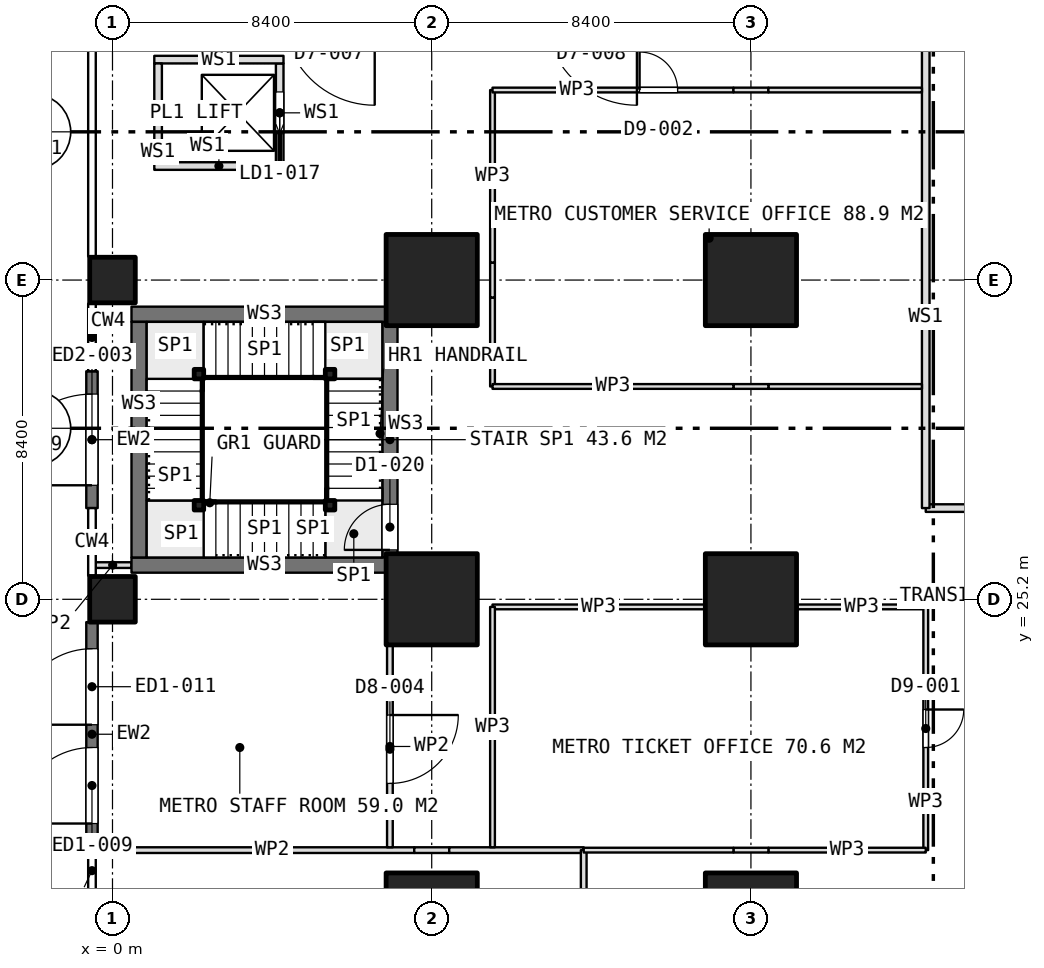
"""IFC4 building model, lengths in metres.
Left out: names, types, materials, properties, quantities, classifications, styles, units other than length and angle.
Written with IfcOpenShell. Run it as: python <this file> out.ifc"""

import sys

from ifc_helpers import new_model, si_unit, direction, frame, frame_2d, origin, origin_2d, place, context, subcontext, project, spatial, rectangle, extrude, element, fill, save


model = new_model("IFC4")
c1 = context("Model", 3, precision=1e-05, world=origin(), true_north=direction((0.0, 1.0)))
c2 = subcontext(c1, "Body", "Model", "MODEL_VIEW")
j1 = project(units=[si_unit("LENGTHUNIT", "METRE"), si_unit("PLANEANGLEUNIT", "RADIAN")], contexts=[c1])
p1 = place(None, origin())
s1 = spatial("IfcSite", under=j1, at=p1, CompositionType="ELEMENT")
p2 = place(p1, origin())
s2 = spatial("IfcBuilding", under=s1, at=p2, CompositionType="ELEMENT")
p3 = place(p2, origin())
s3 = spatial("IfcBuildingStorey", under=s2, at=p3, CompositionType="ELEMENT", Elevation=0.0)
for number, where, z_axis, x_axis in (
    (1, (0.0, 25.2, 0.0), (0.0, 0.0, 1.0), (1.0, 0.0, 0.0)),
    (2, (0.0, 33.6, 0.0), (0.0, 0.0, 1.0), (1.0, 0.0, 0.0)),
):
    element("IfcColumn", number, at=place(p3, frame(where, z_axis=z_axis, x_axis=x_axis)), inside=s3, PredefinedType="COLUMN", context=c2, shape_type="SweptSolid", body=[
        extrude(rectangle(XDim=1.2, YDim=1.2, at=origin_2d()), origin(), (0.0, 0.0, 1.0), 5.4),
    ])
for number, where, z_axis, x_axis in (
    (3, (8.4, 16.8, 0.0), (0.0, 0.0, 1.0), (1.0, 0.0, 0.0)),
    (4, (8.4, 25.2, 0.0), (0.0, 0.0, 1.0), (1.0, 0.0, 0.0)),
    (5, (8.4, 33.6, 0.0), (0.0, 0.0, 1.0), (1.0, 0.0, 0.0)),
    (6, (16.8, 16.8, 0.0), (0.0, 0.0, 1.0), (1.0, 0.0, 0.0)),
    (7, (16.8, 25.2, 0.0), (0.0, 0.0, 1.0), (1.0, 0.0, 0.0)),
    (8, (16.8, 33.6, 0.0), (0.0, 0.0, 1.0), (1.0, 0.0, 0.0)),
):
    element("IfcColumn", number, at=place(p3, frame(where, z_axis=z_axis, x_axis=x_axis)), inside=s3, PredefinedType="COLUMN", context=c2, shape_type="SweptSolid", body=[
        extrude(rectangle(XDim=2.4, YDim=2.4, at=origin_2d()), origin(), (0.0, 0.0, 1.0), 5.4),
    ])
p4 = place(p3, frame((-0.54, 27.6, 0.0), z_axis=(0.0, 0.0, 1.0), x_axis=(0.0, 1.0, 0.0)))
e9 = element("IfcWall", 9, at=p4, inside=s3, PredefinedType="SOLIDWALL", context=c2, shape_type="SweptSolid", body=[
    extrude(rectangle(XDim=3.6, YDim=0.3, at=frame_2d((1.8, 0.0))), origin(), (0.0, 0.0, 1.0), 3.3),
])
p5 = place(p4, frame((0.6, 0.0, 0.0)))
e10 = element("IfcOpeningElement", 10, at=p5, cuts=e9, PredefinedType="OPENING", context=c2, shape_type="SweptSolid", body=[
    extrude(rectangle(XDim=2.4, YDim=2.4, at=frame_2d((1.2, 1.2))), frame((0.0, 0.16, 0.0), z_axis=(0.0, -1.0, 0.0), x_axis=(1.0, 0.0, 0.0)), (0.0, 0.0, 1.0), 0.32),
])
p6 = place(p3, frame((-0.54, 18.7, 0.0), z_axis=(0.0, 0.0, 1.0), x_axis=(0.0, 1.0, 0.0)))
e11 = element("IfcWall", 11, at=p6, inside=s3, PredefinedType="SOLIDWALL", context=c2, shape_type="SweptSolid", body=[
    extrude(rectangle(XDim=5.899, YDim=0.3, at=frame_2d((2.95, 0.0))), origin(), (0.0, 0.0, 1.0), 3.3),
])
p7 = place(p6, frame((3.2, 0.0, 0.0)))
e12 = element("IfcOpeningElement", 12, at=p7, cuts=e11, PredefinedType="OPENING", context=c2, shape_type="SweptSolid", body=[
    extrude(rectangle(XDim=2.0, YDim=2.7, at=frame_2d((1.0, 1.35))), frame((0.0, 0.16, 0.0), z_axis=(0.0, -1.0, 0.0), x_axis=(1.0, 0.0, 0.0)), (0.0, 0.0, 1.0), 0.32),
])
p8 = place(p6, frame((0.6, 0.0, 0.0)))
e13 = element("IfcOpeningElement", 13, at=p8, cuts=e11, PredefinedType="OPENING", context=c2, shape_type="SweptSolid", body=[
    extrude(rectangle(XDim=2.0, YDim=2.7, at=frame_2d((1.0, 1.35))), frame((0.0, 0.16, 0.0), z_axis=(0.0, -1.0, 0.0), x_axis=(1.0, 0.0, 0.0)), (0.0, 0.0, 1.0), 0.32),
])
for number, where, z_axis, x_axis in (
    (14, (0.5, 26.1, 0.0), (0.0, 0.0, 1.0), (1.0, 0.0, 0.0)),
    (15, (0.5, 32.7, 0.0), (0.0, 0.0, 1.0), (1.0, 0.0, 0.0)),
):
    element("IfcWall", number, at=place(p3, frame(where, z_axis=z_axis, x_axis=x_axis)), inside=s3, PredefinedType="SOLIDWALL", context=c2, shape_type="SweptSolid", body=[
        extrude(rectangle(XDim=7.0, YDim=0.4, at=frame_2d((3.5, 0.0))), origin(), (0.0, 0.0, 1.0), 5.1),
    ])
p9 = place(p3, frame((0.7, 26.3, 0.0), z_axis=(0.0, 0.0, 1.0), x_axis=(0.0, 1.0, 0.0)))
e16 = element("IfcWall", 16, at=p9, inside=s3, PredefinedType="SOLIDWALL", context=c2, shape_type="SweptSolid", body=[
    extrude(rectangle(XDim=6.2, YDim=0.4, at=frame_2d((3.1, 0.0))), origin(), (0.0, 0.0, 1.0), 5.1),
])
p10 = place(p3, frame((7.3, 26.3, 0.0), z_axis=(0.0, 0.0, 1.0), x_axis=(0.0, 1.0, 0.0)))
e17 = element("IfcWall", 17, at=p10, inside=s3, PredefinedType="SOLIDWALL", context=c2, shape_type="SweptSolid", body=[
    extrude(rectangle(XDim=6.2, YDim=0.4, at=frame_2d((3.1, 0.0))), origin(), (0.0, 0.0, 1.0), 5.1),
])
p11 = place(p10, frame((0.2, 0.0, 0.0)))
e18 = element("IfcOpeningElement", 18, at=p11, cuts=e17, PredefinedType="OPENING", context=c2, shape_type="SweptSolid", body=[
    extrude(rectangle(XDim=1.2, YDim=2.1, at=frame_2d((0.6, 1.05))), frame((0.0, 0.21, 0.0), z_axis=(0.0, -1.0, 0.0), x_axis=(1.0, 0.0, 0.0)), (0.0, 0.0, 1.0), 0.42),
])
for number, where, z_axis, x_axis in (
    (19, (1.1, 36.6, 0.0), (0.0, 0.0, 1.0), (1.0, 0.0, 0.0)),
    (20, (1.1, 39.4, 0.0), (0.0, 0.0, 1.0), (1.0, 0.0, 0.0)),
):
    element("IfcWall", number, at=place(p3, frame(where, z_axis=z_axis, x_axis=x_axis)), inside=s3, PredefinedType="PARTITIONING", context=c2, shape_type="SweptSolid", body=[
        extrude(rectangle(XDim=3.4, YDim=0.2, at=frame_2d((1.7, 0.0))), origin(), (0.0, 0.0, 1.0), 3.3),
    ])
p12 = place(p3, frame((1.2, 36.7, 0.0), z_axis=(0.0, 0.0, 1.0), x_axis=(0.0, 1.0, 0.0)))
e21 = element("IfcWall", 21, at=p12, inside=s3, PredefinedType="PARTITIONING", context=c2, shape_type="SweptSolid", body=[
    extrude(rectangle(XDim=2.6, YDim=0.2, at=frame_2d((1.3, 0.0))), origin(), (0.0, 0.0, 1.0), 3.3),
])
p13 = place(p3, frame((4.4, 36.7, 0.0), z_axis=(0.0, 0.0, 1.0), x_axis=(0.0, 1.0, 0.0)))
e22 = element("IfcWall", 22, at=p13, inside=s3, PredefinedType="PARTITIONING", context=c2, shape_type="SweptSolid", body=[
    extrude(rectangle(XDim=2.6, YDim=0.2, at=frame_2d((1.3, 0.0))), origin(), (0.0, 0.0, 1.0), 3.3),
])
p14 = place(p13, frame((0.75, 0.0, 0.0)))
e23 = element("IfcOpeningElement", 23, at=p14, cuts=e22, PredefinedType="OPENING", context=c2, shape_type="SweptSolid", body=[
    extrude(rectangle(XDim=1.1, YDim=2.1, at=frame_2d((0.55, 1.05))), frame((0.0, 0.11, 0.0), z_axis=(0.0, -1.0, 0.0), x_axis=(1.0, 0.0, 0.0)), (0.0, 0.0, 1.0), 0.22),
])
p15 = place(p3, frame((24.65, 27.6, 0.0), z_axis=(0.0, 0.0, 1.0), x_axis=(-1.0, 0.0, 0.0)))
e24 = element("IfcWall", 24, at=p15, inside=s3, PredefinedType="PARTITIONING", context=c2, shape_type="SweptSolid", body=[
    extrude(rectangle(XDim=3.25, YDim=0.2, at=frame_2d((1.625, 0.0))), origin(), (0.0, 0.0, 1.0), 5.1),
])
p16 = place(p3, frame((21.4, 27.6, 0.0), z_axis=(0.0, 0.0, 1.0), x_axis=(0.0, 1.0, 0.0)))
e25 = element("IfcWall", 25, at=p16, inside=s3, PredefinedType="PARTITIONING", context=c2, shape_type="SweptSolid", body=[
    extrude(rectangle(XDim=14.4, YDim=0.2, at=frame_2d((7.2, 0.0))), origin(), (0.0, 0.0, 1.0), 5.1),
])
p17 = place(p3, frame((-0.45, 18.6, 0.0), z_axis=(0.0, 0.0, 1.0), x_axis=(1.0, 0.0, 0.0)))
e26 = element("IfcWall", 26, at=p17, inside=s3, PredefinedType="PARTITIONING", context=c2, shape_type="SweptSolid", body=[
    extrude(rectangle(XDim=0.91, YDim=0.15, at=frame_2d((0.455, 0.0))), origin(), (0.0, 0.0, 1.0), 3.3),
])
p18 = place(p3, frame((0.46, 18.6, 0.0), z_axis=(0.0, 0.0, 1.0), x_axis=(1.0, 0.0, 0.0)))
e27 = element("IfcWall", 27, at=p18, inside=s3, PredefinedType="PARTITIONING", context=c2, shape_type="SweptSolid", body=[
    extrude(rectangle(XDim=7.48, YDim=0.15, at=frame_2d((3.74, 0.0))), origin(), (0.0, 0.0, 1.0), 5.1),
])
p19 = place(p3, frame((7.94, 18.6, 0.0), z_axis=(0.0, 0.0, 1.0), x_axis=(1.0, 0.0, 0.0)))
e28 = element("IfcWall", 28, at=p19, inside=s3, PredefinedType="PARTITIONING", context=c2, shape_type="SweptSolid", body=[
    extrude(rectangle(XDim=0.92, YDim=0.15, at=frame_2d((0.46, 0.0))), origin(), (0.0, 0.0, 1.0), 3.3),
])
p20 = place(p3, frame((8.86, 18.6, 0.0), z_axis=(0.0, 0.0, 1.0), x_axis=(1.0, 0.0, 0.0)))
e29 = element("IfcWall", 29, at=p20, inside=s3, PredefinedType="PARTITIONING", context=c2, shape_type="SweptSolid", body=[
    extrude(rectangle(XDim=3.54, YDim=0.15, at=frame_2d((1.77, 0.0))), origin(), (0.0, 0.0, 1.0), 5.1),
])
p21 = place(p3, frame((12.4, 18.6, 0.0), z_axis=(0.0, 0.0, 1.0), x_axis=(0.0, -1.0, 0.0)))
e30 = element("IfcWall", 30, at=p21, inside=s3, PredefinedType="PARTITIONING", context=c2, shape_type="SweptSolid", body=[
    extrude(rectangle(XDim=1.34, YDim=0.15, at=frame_2d((0.67, 0.0))), origin(), (0.0, 0.0, 1.0), 5.1),
])
p22 = place(p3, frame((10.0, 25.0, 0.0), z_axis=(0.0, 0.0, 1.0), x_axis=(1.0, 0.0, 0.0)))
e31 = element("IfcWall", 31, at=p22, inside=s3, PredefinedType="PARTITIONING", context=c2, shape_type="SweptSolid", body=[
    extrude(rectangle(XDim=5.58, YDim=0.125, at=frame_2d((2.79, 0.0))), origin(), (0.0, 0.0, 1.0), 3.3),
])
p23 = place(p3, frame((18.02, 25.0, 0.0), z_axis=(0.0, 0.0, 1.0), x_axis=(1.0, 0.0, 0.0)))
e32 = element("IfcWall", 32, at=p23, inside=s3, PredefinedType="PARTITIONING", context=c2, shape_type="SweptSolid", body=[
    extrude(rectangle(XDim=3.38, YDim=0.125, at=frame_2d((1.69, 0.0))), origin(), (0.0, 0.0, 1.0), 5.1),
])
p24 = place(p3, frame((21.4, 25.0, 0.0), z_axis=(0.0, 0.0, 1.0), x_axis=(0.0, -1.0, 0.0)))
e33 = element("IfcWall", 33, at=p24, inside=s3, PredefinedType="PARTITIONING", context=c2, shape_type="SweptSolid", body=[
    extrude(rectangle(XDim=6.4, YDim=0.125, at=frame_2d((3.2, 0.0))), origin(), (0.0, 0.0, 1.0), 5.1),
])
p25 = place(p24, frame((2.7, 0.0, 0.0)))
e34 = element("IfcOpeningElement", 34, at=p25, cuts=e33, PredefinedType="OPENING", context=c2, shape_type="SweptSolid", body=[
    extrude(rectangle(XDim=1.0, YDim=2.1, at=frame_2d((0.5, 1.05))), frame((0.0, 0.073, 0.0), z_axis=(0.0, -1.0, 0.0), x_axis=(1.0, 0.0, 0.0)), (0.0, 0.0, 1.0), 0.145),
])
p26 = place(p3, frame((21.4, 18.6, 0.0), z_axis=(0.0, 0.0, 1.0), x_axis=(-1.0, 0.0, 0.0)))
e35 = element("IfcWall", 35, at=p26, inside=s3, PredefinedType="PARTITIONING", context=c2, shape_type="SweptSolid", body=[
    extrude(rectangle(XDim=4.14, YDim=0.125, at=frame_2d((2.07, 0.0))), origin(), (0.0, 0.0, 1.0), 5.1),
])
p27 = place(p3, frame((17.26, 18.6, 0.0), z_axis=(0.0, 0.0, 1.0), x_axis=(-1.0, 0.0, 0.0)))
e36 = element("IfcWall", 36, at=p27, inside=s3, PredefinedType="PARTITIONING", context=c2, shape_type="SweptSolid", body=[
    extrude(rectangle(XDim=0.92, YDim=0.125, at=frame_2d((0.46, 0.0))), origin(), (0.0, 0.0, 1.0), 3.3),
])
p28 = place(p3, frame((16.34, 18.6, 0.0), z_axis=(0.0, 0.0, 1.0), x_axis=(-1.0, 0.0, 0.0)))
e37 = element("IfcWall", 37, at=p28, inside=s3, PredefinedType="PARTITIONING", context=c2, shape_type="SweptSolid", body=[
    extrude(rectangle(XDim=3.94, YDim=0.125, at=frame_2d((1.97, 0.0))), origin(), (0.0, 0.0, 1.0), 5.1),
])
p29 = place(p3, frame((10.0, 18.675, 0.0), z_axis=(0.0, 0.0, 1.0), x_axis=(0.0, 1.0, 0.0)))
e38 = element("IfcWall", 38, at=p29, inside=s3, PredefinedType="PARTITIONING", context=c2, shape_type="SweptSolid", body=[
    extrude(rectangle(XDim=6.325, YDim=0.125, at=frame_2d((3.163, 0.0))), origin(), (0.0, 0.0, 1.0), 3.3),
])
p30 = place(p3, frame((10.0, 30.8, 0.0), z_axis=(0.0, 0.0, 1.0), x_axis=(0.0, 1.0, 0.0)))
e39 = element("IfcWall", 39, at=p30, inside=s3, PredefinedType="PARTITIONING", context=c2, shape_type="SweptSolid", body=[
    extrude(rectangle(XDim=2.34, YDim=0.125, at=frame_2d((1.17, 0.0))), origin(), (0.0, 0.0, 1.0), 5.1),
])
p31 = place(p3, frame((10.0, 33.14, 0.0), z_axis=(0.0, 0.0, 1.0), x_axis=(0.0, 1.0, 0.0)))
e40 = element("IfcWall", 40, at=p31, inside=s3, PredefinedType="PARTITIONING", context=c2, shape_type="SweptSolid", body=[
    extrude(rectangle(XDim=0.92, YDim=0.125, at=frame_2d((0.46, 0.0))), origin(), (0.0, 0.0, 1.0), 3.3),
])
p32 = place(p3, frame((10.0, 34.06, 0.0), z_axis=(0.0, 0.0, 1.0), x_axis=(0.0, 1.0, 0.0)))
e41 = element("IfcWall", 41, at=p32, inside=s3, PredefinedType="PARTITIONING", context=c2, shape_type="SweptSolid", body=[
    extrude(rectangle(XDim=4.54, YDim=0.125, at=frame_2d((2.27, 0.0))), origin(), (0.0, 0.0, 1.0), 5.1),
])
p33 = place(p3, frame((10.0, 38.6, 0.0), z_axis=(0.0, 0.0, 1.0), x_axis=(1.0, 0.0, 0.0)))
e42 = element("IfcWall", 42, at=p33, inside=s3, PredefinedType="PARTITIONING", context=c2, shape_type="SweptSolid", body=[
    extrude(rectangle(XDim=6.34, YDim=0.125, at=frame_2d((3.17, 0.0))), origin(), (0.0, 0.0, 1.0), 5.1),
])
p34 = place(p33, frame((3.87, 0.0, 0.0)))
e43 = element("IfcOpeningElement", 43, at=p34, cuts=e42, PredefinedType="OPENING", context=c2, shape_type="SweptSolid", body=[
    extrude(rectangle(XDim=1.0, YDim=2.1, at=frame_2d((0.5, 1.05))), frame((0.0, 0.073, 0.0), z_axis=(0.0, -1.0, 0.0), x_axis=(1.0, 0.0, 0.0)), (0.0, 0.0, 1.0), 0.145),
])
p35 = place(p3, frame((16.34, 38.6, 0.0), z_axis=(0.0, 0.0, 1.0), x_axis=(1.0, 0.0, 0.0)))
e44 = element("IfcWall", 44, at=p35, inside=s3, PredefinedType="PARTITIONING", context=c2, shape_type="SweptSolid", body=[
    extrude(rectangle(XDim=0.92, YDim=0.125, at=frame_2d((0.46, 0.0))), origin(), (0.0, 0.0, 1.0), 3.3),
])
for number, where, z_axis, x_axis in (
    (45, (17.26, 38.6, 0.0), (0.0, 0.0, 1.0), (1.0, 0.0, 0.0)),
    (46, (21.3, 30.8, 0.0), (0.0, 0.0, 1.0), (-1.0, 0.0, 0.0)),
):
    element("IfcWall", number, at=place(p3, frame(where, z_axis=z_axis, x_axis=x_axis)), inside=s3, PredefinedType="PARTITIONING", context=c2, shape_type="SweptSolid", body=[
        extrude(rectangle(XDim=4.04, YDim=0.125, at=frame_2d((2.02, 0.0))), origin(), (0.0, 0.0, 1.0), 5.1),
    ])
p36 = place(p3, frame((17.26, 30.8, 0.0), z_axis=(0.0, 0.0, 1.0), x_axis=(-1.0, 0.0, 0.0)))
e47 = element("IfcWall", 47, at=p36, inside=s3, PredefinedType="PARTITIONING", context=c2, shape_type="SweptSolid", body=[
    extrude(rectangle(XDim=0.92, YDim=0.125, at=frame_2d((0.46, 0.0))), origin(), (0.0, 0.0, 1.0), 3.3),
])
p37 = place(p3, frame((16.34, 30.8, 0.0), z_axis=(0.0, 0.0, 1.0), x_axis=(-1.0, 0.0, 0.0)))
e48 = element("IfcWall", 48, at=p37, inside=s3, PredefinedType="PARTITIONING", context=c2, shape_type="SweptSolid", body=[
    extrude(rectangle(XDim=6.34, YDim=0.125, at=frame_2d((3.17, 0.0))), origin(), (0.0, 0.0, 1.0), 5.1),
])
p38 = place(p3, frame((-0.49, 26.1, 0.0), z_axis=(0.0, 0.0, 1.0), x_axis=(1.0, 0.0, 0.0)))
e49 = element("IfcWall", 49, at=p38, inside=s3, PredefinedType="PARTITIONING", context=c2, shape_type="SweptSolid", body=[
    extrude(rectangle(XDim=0.99, YDim=0.15, at=frame_2d((0.495, 0.0))), origin(), (0.0, 0.0, 1.0), 3.3),
])
p39 = place(p3, frame((7.3, 23.98, 0.0), z_axis=(0.0, 0.0, 1.0), x_axis=(0.0, -1.0, 0.0)))
e50 = element("IfcWall", 50, at=p39, inside=s3, PredefinedType="PARTITIONING", context=c2, shape_type="SweptSolid", body=[
    extrude(rectangle(XDim=5.305, YDim=0.15, at=frame_2d((2.652, 0.0))), origin(), (0.0, 0.0, 1.0), 5.1),
])
p40 = place(p39, frame((1.825, 0.0, 0.0)))
e51 = element("IfcOpeningElement", 51, at=p40, cuts=e50, PredefinedType="OPENING", context=c2, shape_type="SweptSolid", body=[
    extrude(rectangle(XDim=1.8, YDim=2.1, at=frame_2d((0.9, 1.05))), frame((0.0, 0.085, 0.0), z_axis=(0.0, -1.0, 0.0), x_axis=(1.0, 0.0, 0.0)), (0.0, 0.0, 1.0), 0.17),
])
for number, where, z_axis, x_axis in (
    (52, (5.725, 27.675, 0.0), (0.0, 0.0, 1.0), (1.0, 0.0, 0.0)),
    (53, (2.275, 27.675, 0.0), (0.0, 0.0, 1.0), (1.0, 0.0, 0.0)),
    (54, (2.275, 31.125, 0.0), (0.0, 0.0, 1.0), (1.0, 0.0, 0.0)),
    (55, (5.725, 31.125, 0.0), (0.0, 0.0, 1.0), (1.0, 0.0, 0.0)),
):
    element("IfcColumn", number, at=place(p3, frame(where, z_axis=z_axis, x_axis=x_axis)), inside=s3, PredefinedType="COLUMN", context=c2, shape_type="SweptSolid", body=[
        extrude(rectangle(XDim=0.25, YDim=0.25, at=origin_2d()), origin(), (0.0, 0.0, 1.0), 5.4),
    ])
p41 = place(p5, origin())
e56 = element("IfcDoor", 56, at=p41, inside=s3, OperationType="DOUBLE_DOOR_SINGLE_SWING", PredefinedType="DOOR", context=c2, shape_type="SweptSolid", body=[
    extrude(rectangle(XDim=2.4, YDim=2.4, at=frame_2d((1.2, 1.2))), frame((0.0, 0.025, 0.0), z_axis=(0.0, -1.0, 0.0), x_axis=(1.0, 0.0, 0.0)), (0.0, 0.0, 1.0), 0.05),
])
fill(e10, e56)
p42 = place(p7, origin())
e57 = element("IfcDoor", 57, at=p42, inside=s3, OperationType="DOUBLE_DOOR_SINGLE_SWING", PredefinedType="DOOR", context=c2, shape_type="SweptSolid", body=[
    extrude(rectangle(XDim=2.0, YDim=2.7, at=frame_2d((1.0, 1.35))), frame((0.0, 0.025, 0.0), z_axis=(0.0, -1.0, 0.0), x_axis=(1.0, 0.0, 0.0)), (0.0, 0.0, 1.0), 0.05),
])
fill(e12, e57)
p43 = place(p8, origin())
e58 = element("IfcDoor", 58, at=p43, inside=s3, OperationType="DOUBLE_DOOR_SINGLE_SWING", PredefinedType="DOOR", context=c2, shape_type="SweptSolid", body=[
    extrude(rectangle(XDim=2.0, YDim=2.7, at=frame_2d((1.0, 1.35))), frame((0.0, 0.025, 0.0), z_axis=(0.0, -1.0, 0.0), x_axis=(1.0, 0.0, 0.0)), (0.0, 0.0, 1.0), 0.05),
])
fill(e13, e58)
p44 = place(p14, origin())
e59 = element("IfcDoor", 59, at=p44, inside=s3, OperationType="SLIDING_TO_LEFT", PredefinedType="USERDEFINED", context=c2, shape_type="SweptSolid", body=[
    extrude(rectangle(XDim=1.1, YDim=2.1, at=frame_2d((0.55, 1.05))), frame((0.0, 0.025, 0.0), z_axis=(0.0, -1.0, 0.0), x_axis=(1.0, 0.0, 0.0)), (0.0, 0.0, 1.0), 0.05),
])
fill(e23, e59)
p45 = place(p25, origin())
e60 = element("IfcDoor", 60, at=p45, inside=s3, OperationType="SINGLE_SWING_LEFT", PredefinedType="DOOR", context=c2, shape_type="SweptSolid", body=[
    extrude(rectangle(XDim=1.0, YDim=2.1, at=frame_2d((0.5, 1.05))), frame((0.0, 0.025, 0.0), z_axis=(0.0, -1.0, 0.0), x_axis=(1.0, 0.0, 0.0)), (0.0, 0.0, 1.0), 0.05),
])
fill(e34, e60)
p46 = place(p34, origin())
e61 = element("IfcDoor", 61, at=p46, inside=s3, OperationType="SINGLE_SWING_LEFT", PredefinedType="DOOR", context=c2, shape_type="SweptSolid", body=[
    extrude(rectangle(XDim=1.0, YDim=2.1, at=frame_2d((0.5, 1.05))), frame((0.0, 0.025, 0.0), z_axis=(0.0, -1.0, 0.0), x_axis=(1.0, 0.0, 0.0)), (0.0, 0.0, 1.0), 0.05),
])
fill(e43, e61)
p47 = place(p40, origin())
e62 = element("IfcDoor", 62, at=p47, inside=s3, OperationType="DOUBLE_DOOR_SINGLE_SWING", PredefinedType="DOOR", context=c2, shape_type="SweptSolid", body=[
    extrude(rectangle(XDim=1.8, YDim=2.1, at=frame_2d((0.9, 1.05))), frame((0.0, 0.025, 0.0), z_axis=(0.0, -1.0, 0.0), x_axis=(1.0, 0.0, 0.0)), (0.0, 0.0, 1.0), 0.05),
])
fill(e51, e62)
p48 = place(p11, origin())
e63 = element("IfcDoor", 63, at=p48, inside=s3, OperationType="SINGLE_SWING_RIGHT", PredefinedType="DOOR", context=c2, shape_type="SweptSolid", body=[
    extrude(rectangle(XDim=1.2, YDim=2.1, at=frame_2d((0.6, 1.05))), frame((0.0, 0.025, 0.0), z_axis=(0.0, -1.0, 0.0), x_axis=(1.0, 0.0, 0.0)), (0.0, 0.0, 1.0), 0.05),
])
fill(e18, e63)
save(model, sys.argv[1])
